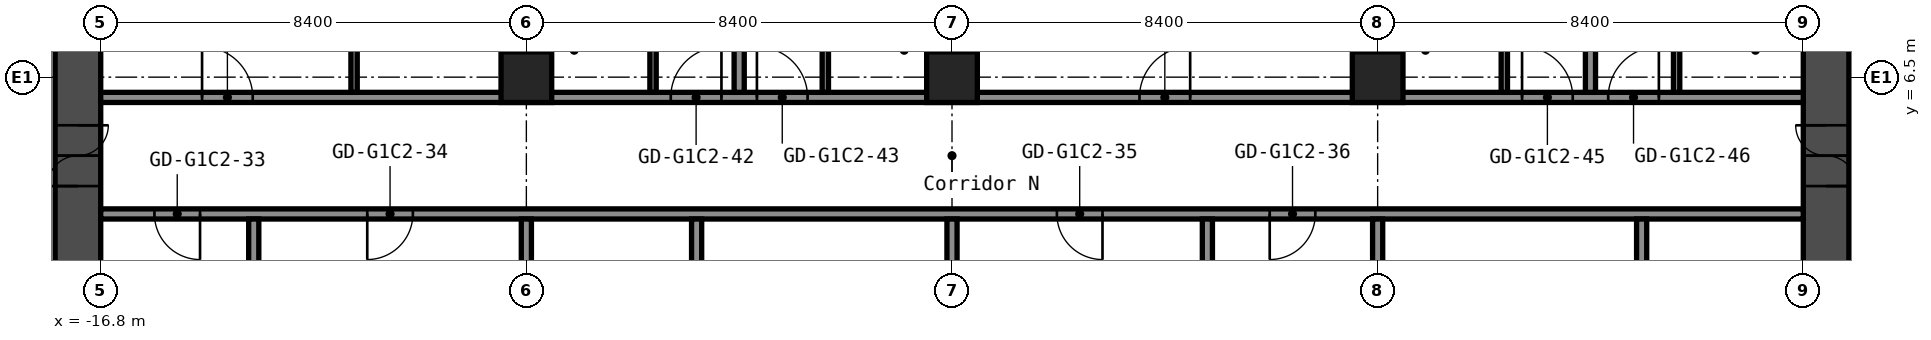
"""IFC4 building model, lengths in metres.
Left out: names, types, materials, properties, quantities, classifications, styles, units other than length and angle.
Written with IfcOpenShell. Run it as: python <this file> out.ifc"""

import sys

from ifc_helpers import new_model, si_unit, direction, frame, frame_2d, origin, origin_2d, place, context, subcontext, project, spatial, rectangle, hollow_rectangle, extrude, element, fill, save


model = new_model("IFC4")
c1 = context("Model", 3, precision=1e-05, world=origin(), true_north=direction((0.0, 1.0)))
c2 = subcontext(c1, "Body", "Model", "MODEL_VIEW")
j1 = project(units=[si_unit("LENGTHUNIT", "METRE"), si_unit("PLANEANGLEUNIT", "RADIAN")], contexts=[c1])
p1 = place(None, origin())
s1 = spatial("IfcSite", under=j1, at=p1, CompositionType="ELEMENT")
p2 = place(p1, origin())
s2 = spatial("IfcBuilding", under=s1, at=p2, CompositionType="ELEMENT")
p3 = place(p2, frame((0.0, 0.0, 58.2)))
s3 = spatial("IfcBuildingStorey", under=s2, at=p3, CompositionType="ELEMENT", Elevation=58.2)
for number, where, z_axis, x_axis in (
    (1, (-8.4, 6.5, 0.0), (0.0, 0.0, 1.0), (1.0, 0.0, 0.0)),
    (2, (0.0, 6.5, 0.0), (0.0, 0.0, 1.0), (1.0, 0.0, 0.0)),
    (3, (8.4, 6.5, 0.0), (0.0, 0.0, 1.0), (1.0, 0.0, 0.0)),
):
    element("IfcColumn", number, at=place(p3, frame(where, z_axis=z_axis, x_axis=x_axis)), inside=s3, PredefinedType="COLUMN", context=c2, shape_type="SweptSolid", body=[
        extrude(hollow_rectangle(XDim=1.0, YDim=1.0, WallThickness=0.04, at=origin_2d()), origin(), (0.0, 0.0, 1.0), 2.8),
    ])
p4 = place(p3, frame((-17.25, -8.4, 0.0), z_axis=(0.0, 0.0, 1.0), x_axis=(0.0, 1.0, 0.0)))
e4 = element("IfcWall", 4, at=p4, inside=s3, PredefinedType="SHEAR", context=c2, shape_type="SweptSolid", body=[
    extrude(rectangle(XDim=16.8, YDim=0.9, at=frame_2d((8.4, 0.0))), origin(), (0.0, 0.0, 1.0), 2.8),
])
p5 = place(p4, frame((12.75, 0.0, 0.0)))
e5 = element("IfcOpeningElement", 5, at=p5, cuts=e4, PredefinedType="OPENING", context=c2, shape_type="SweptSolid", body=[
    extrude(rectangle(XDim=1.2, YDim=2.1, at=frame_2d((0.6, 1.05))), frame((0.0, 0.46, 0.0), z_axis=(0.0, -1.0, 0.0), x_axis=(1.0, 0.0, 0.0)), (0.0, 0.0, 1.0), 0.92),
])
p6 = place(p4, frame((2.85, 0.0, 0.0)))
e6 = element("IfcOpeningElement", 6, at=p6, cuts=e4, PredefinedType="OPENING", context=c2, shape_type="SweptSolid", body=[
    extrude(rectangle(XDim=1.2, YDim=2.1, at=frame_2d((0.6, 1.05))), frame((0.0, 0.46, 0.0), z_axis=(0.0, -1.0, 0.0), x_axis=(1.0, 0.0, 0.0)), (0.0, 0.0, 1.0), 0.92),
])
p7 = place(p3, frame((17.25, -8.4, 0.0), z_axis=(0.0, 0.0, 1.0), x_axis=(0.0, 1.0, 0.0)))
e7 = element("IfcWall", 7, at=p7, inside=s3, PredefinedType="SHEAR", context=c2, shape_type="SweptSolid", body=[
    extrude(rectangle(XDim=16.8, YDim=0.9, at=frame_2d((8.4, 0.0))), origin(), (0.0, 0.0, 1.0), 2.8),
])
p8 = place(p7, frame((12.75, 0.0, 0.0)))
e8 = element("IfcOpeningElement", 8, at=p8, cuts=e7, PredefinedType="OPENING", context=c2, shape_type="SweptSolid", body=[
    extrude(rectangle(XDim=1.2, YDim=2.1, at=frame_2d((0.6, 1.05))), frame((0.0, 0.46, 0.0), z_axis=(0.0, -1.0, 0.0), x_axis=(1.0, 0.0, 0.0)), (0.0, 0.0, 1.0), 0.92),
])
p9 = place(p7, frame((2.85, 0.0, 0.0)))
e9 = element("IfcOpeningElement", 9, at=p9, cuts=e7, PredefinedType="OPENING", context=c2, shape_type="SweptSolid", body=[
    extrude(rectangle(XDim=1.2, YDim=2.1, at=frame_2d((0.6, 1.05))), frame((0.0, 0.46, 0.0), z_axis=(0.0, -1.0, 0.0), x_axis=(1.0, 0.0, 0.0)), (0.0, 0.0, 1.0), 0.92),
])
p10 = place(p3, frame((-16.8, 3.8, 0.0), z_axis=(0.0, 0.0, 1.0), x_axis=(1.0, 0.0, 0.0)))
e10 = element("IfcWall", 10, at=p10, inside=s3, PredefinedType="PARTITIONING", context=c2, shape_type="SweptSolid", body=[
    extrude(rectangle(XDim=33.6, YDim=0.2, at=frame_2d((16.8, 0.0))), origin(), (0.0, 0.0, 1.0), 2.8),
])
p11 = place(p10, frame((1.06, 0.0, 0.0)))
e11 = element("IfcOpeningElement", 11, at=p11, cuts=e10, PredefinedType="OPENING", context=c2, shape_type="SweptSolid", body=[
    extrude(rectangle(XDim=0.9, YDim=2.1, at=frame_2d((0.45, 1.05))), frame((0.0, 0.11, 0.0), z_axis=(0.0, -1.0, 0.0), x_axis=(1.0, 0.0, 0.0)), (0.0, 0.0, 1.0), 0.22),
])
p12 = place(p10, frame((5.26, 0.0, 0.0)))
e12 = element("IfcOpeningElement", 12, at=p12, cuts=e10, PredefinedType="OPENING", context=c2, shape_type="SweptSolid", body=[
    extrude(rectangle(XDim=0.9, YDim=2.1, at=frame_2d((0.45, 1.05))), frame((0.0, 0.11, 0.0), z_axis=(0.0, -1.0, 0.0), x_axis=(1.0, 0.0, 0.0)), (0.0, 0.0, 1.0), 0.22),
])
p13 = place(p10, frame((18.87, 0.0, 0.0)))
e13 = element("IfcOpeningElement", 13, at=p13, cuts=e10, PredefinedType="OPENING", context=c2, shape_type="SweptSolid", body=[
    extrude(rectangle(XDim=0.9, YDim=2.1, at=frame_2d((0.45, 1.05))), frame((0.0, 0.11, 0.0), z_axis=(0.0, -1.0, 0.0), x_axis=(1.0, 0.0, 0.0)), (0.0, 0.0, 1.0), 0.22),
])
p14 = place(p10, frame((23.07, 0.0, 0.0)))
e14 = element("IfcOpeningElement", 14, at=p14, cuts=e10, PredefinedType="OPENING", context=c2, shape_type="SweptSolid", body=[
    extrude(rectangle(XDim=0.9, YDim=2.1, at=frame_2d((0.45, 1.05))), frame((0.0, 0.11, 0.0), z_axis=(0.0, -1.0, 0.0), x_axis=(1.0, 0.0, 0.0)), (0.0, 0.0, 1.0), 0.22),
])
p15 = place(p3, frame((-16.8, 6.1, 0.0), z_axis=(0.0, 0.0, 1.0), x_axis=(1.0, 0.0, 0.0)))
e15 = element("IfcWall", 15, at=p15, inside=s3, PredefinedType="PARTITIONING", context=c2, shape_type="SweptSolid", body=[
    extrude(rectangle(XDim=33.6, YDim=0.2, at=frame_2d((16.8, 0.0))), origin(), (0.0, 0.0, 1.0), 2.8),
])
p16 = place(p15, frame((2.0, 0.0, 0.0)))
e16 = element("IfcOpeningElement", 16, at=p16, cuts=e15, PredefinedType="OPENING", context=c2, shape_type="SweptSolid", body=[
    extrude(rectangle(XDim=1.0, YDim=2.1, at=frame_2d((0.5, 1.05))), frame((0.0, 0.11, 0.0), z_axis=(0.0, -1.0, 0.0), x_axis=(1.0, 0.0, 0.0)), (0.0, 0.0, 1.0), 0.22),
])
p17 = place(p15, frame((11.25, 0.0, 0.0)))
e17 = element("IfcOpeningElement", 17, at=p17, cuts=e15, PredefinedType="OPENING", context=c2, shape_type="SweptSolid", body=[
    extrude(rectangle(XDim=1.0, YDim=2.1, at=frame_2d((0.5, 1.05))), frame((0.0, 0.11, 0.0), z_axis=(0.0, -1.0, 0.0), x_axis=(1.0, 0.0, 0.0)), (0.0, 0.0, 1.0), 0.22),
])
p18 = place(p15, frame((12.95, 0.0, 0.0)))
e18 = element("IfcOpeningElement", 18, at=p18, cuts=e15, PredefinedType="OPENING", context=c2, shape_type="SweptSolid", body=[
    extrude(rectangle(XDim=1.0, YDim=2.1, at=frame_2d((0.5, 1.05))), frame((0.0, 0.11, 0.0), z_axis=(0.0, -1.0, 0.0), x_axis=(1.0, 0.0, 0.0)), (0.0, 0.0, 1.0), 0.22),
])
p19 = place(p15, frame((20.5, 0.0, 0.0)))
e19 = element("IfcOpeningElement", 19, at=p19, cuts=e15, PredefinedType="OPENING", context=c2, shape_type="SweptSolid", body=[
    extrude(rectangle(XDim=1.0, YDim=2.1, at=frame_2d((0.5, 1.05))), frame((0.0, 0.11, 0.0), z_axis=(0.0, -1.0, 0.0), x_axis=(1.0, 0.0, 0.0)), (0.0, 0.0, 1.0), 0.22),
])
p20 = place(p15, frame((28.05, 0.0, 0.0)))
e20 = element("IfcOpeningElement", 20, at=p20, cuts=e15, PredefinedType="OPENING", context=c2, shape_type="SweptSolid", body=[
    extrude(rectangle(XDim=1.0, YDim=2.1, at=frame_2d((0.5, 1.05))), frame((0.0, 0.11, 0.0), z_axis=(0.0, -1.0, 0.0), x_axis=(1.0, 0.0, 0.0)), (0.0, 0.0, 1.0), 0.22),
])
p21 = place(p15, frame((29.75, 0.0, 0.0)))
e21 = element("IfcOpeningElement", 21, at=p21, cuts=e15, PredefinedType="OPENING", context=c2, shape_type="SweptSolid", body=[
    extrude(rectangle(XDim=1.0, YDim=2.1, at=frame_2d((0.5, 1.05))), frame((0.0, 0.11, 0.0), z_axis=(0.0, -1.0, 0.0), x_axis=(1.0, 0.0, 0.0)), (0.0, 0.0, 1.0), 0.22),
])
p22 = place(p3, frame((-13.78, -3.7, 0.0), z_axis=(0.0, 0.0, 1.0), x_axis=(0.0, 1.0, 0.0)))
e22 = element("IfcWall", 22, at=p22, inside=s3, PredefinedType="PARTITIONING", context=c2, shape_type="SweptSolid", body=[
    extrude(rectangle(XDim=7.4, YDim=0.2, at=frame_2d((3.7, 0.0))), origin(), (0.0, 0.0, 1.0), 2.8),
])
p23 = place(p3, frame((-11.8, 6.2, 0.0), z_axis=(0.0, 0.0, 1.0), x_axis=(0.0, 1.0, 0.0)))
e23 = element("IfcWall", 23, at=p23, inside=s3, PredefinedType="PARTITIONING", context=c2, shape_type="SweptSolid", body=[
    extrude(rectangle(XDim=3.3, YDim=0.125, at=frame_2d((1.65, 0.0))), origin(), (0.0, 0.0, 1.0), 2.8),
])
p24 = place(p3, frame((-8.4, -3.7, 0.0), z_axis=(0.0, 0.0, 1.0), x_axis=(0.0, 1.0, 0.0)))
e24 = element("IfcWall", 24, at=p24, inside=s3, PredefinedType="PARTITIONING", context=c2, shape_type="SweptSolid", body=[
    extrude(rectangle(XDim=7.4, YDim=0.2, at=frame_2d((3.7, 0.0))), origin(), (0.0, 0.0, 1.0), 2.8),
])
p25 = place(p3, frame((-8.4, 6.99, 0.0), z_axis=(0.0, 0.0, 1.0), x_axis=(0.0, 1.0, 0.0)))
e25 = element("IfcWall", 25, at=p25, inside=s3, PredefinedType="PARTITIONING", context=c2, shape_type="SweptSolid", body=[
    extrude(rectangle(XDim=13.31, YDim=0.2, at=frame_2d((6.655, 0.0))), origin(), (0.0, 0.0, 1.0), 2.8),
])
p26 = place(p3, frame((-5.9, 6.2, 0.0), z_axis=(0.0, 0.0, 1.0), x_axis=(0.0, 1.0, 0.0)))
e26 = element("IfcWall", 26, at=p26, inside=s3, PredefinedType="PARTITIONING", context=c2, shape_type="SweptSolid", body=[
    extrude(rectangle(XDim=2.9, YDim=0.125, at=frame_2d((1.45, 0.0))), origin(), (0.0, 0.0, 1.0), 2.8),
])
p27 = place(p26, frame((1.5, 0.0, 0.0)))
e27 = element("IfcOpeningElement", 27, at=p27, cuts=e26, PredefinedType="OPENING", context=c2, shape_type="SweptSolid", body=[
    extrude(rectangle(XDim=0.8, YDim=2.1, at=frame_2d((0.4, 1.05))), frame((0.0, 0.073, 0.0), z_axis=(0.0, -1.0, 0.0), x_axis=(1.0, 0.0, 0.0)), (0.0, 0.0, 1.0), 0.145),
])
p28 = place(p3, frame((-5.04, -3.7, 0.0), z_axis=(0.0, 0.0, 1.0), x_axis=(0.0, 1.0, 0.0)))
e28 = element("IfcWall", 28, at=p28, inside=s3, PredefinedType="PARTITIONING", context=c2, shape_type="SweptSolid", body=[
    extrude(rectangle(XDim=7.4, YDim=0.2, at=frame_2d((3.7, 0.0))), origin(), (0.0, 0.0, 1.0), 2.8),
])
p29 = place(p3, frame((-4.2, 6.2, 0.0), z_axis=(0.0, 0.0, 1.0), x_axis=(0.0, 1.0, 0.0)))
e29 = element("IfcWall", 29, at=p29, inside=s3, PredefinedType="PARTITIONING", context=c2, shape_type="SweptSolid", body=[
    extrude(rectangle(XDim=14.1, YDim=0.2, at=frame_2d((7.05, 0.0))), origin(), (0.0, 0.0, 1.0), 2.8),
])
p30 = place(p3, frame((-2.5, 6.2, 0.0), z_axis=(0.0, 0.0, 1.0), x_axis=(0.0, 1.0, 0.0)))
e30 = element("IfcWall", 30, at=p30, inside=s3, PredefinedType="PARTITIONING", context=c2, shape_type="SweptSolid", body=[
    extrude(rectangle(XDim=2.9, YDim=0.125, at=frame_2d((1.45, 0.0))), origin(), (0.0, 0.0, 1.0), 2.8),
])
p31 = place(p30, frame((1.5, 0.0, 0.0)))
e31 = element("IfcOpeningElement", 31, at=p31, cuts=e30, PredefinedType="OPENING", context=c2, shape_type="SweptSolid", body=[
    extrude(rectangle(XDim=0.8, YDim=2.1, at=frame_2d((0.4, 1.05))), frame((0.0, 0.073, 0.0), z_axis=(0.0, -1.0, 0.0), x_axis=(1.0, 0.0, 0.0)), (0.0, 0.0, 1.0), 0.145),
])
p32 = place(p3, frame((0.0, -3.7, 0.0), z_axis=(0.0, 0.0, 1.0), x_axis=(0.0, 1.0, 0.0)))
e32 = element("IfcWall", 32, at=p32, inside=s3, PredefinedType="PARTITIONING", context=c2, shape_type="SweptSolid", body=[
    extrude(rectangle(XDim=7.4, YDim=0.2, at=frame_2d((3.7, 0.0))), origin(), (0.0, 0.0, 1.0), 2.8),
])
p33 = place(p3, frame((0.0, 6.99, 0.0), z_axis=(0.0, 0.0, 1.0), x_axis=(0.0, 1.0, 0.0)))
e33 = element("IfcWall", 33, at=p33, inside=s3, PredefinedType="PARTITIONING", context=c2, shape_type="SweptSolid", body=[
    extrude(rectangle(XDim=13.31, YDim=0.2, at=frame_2d((6.655, 0.0))), origin(), (0.0, 0.0, 1.0), 2.8),
])
for number, where, z_axis, x_axis in (
    (34, (5.04, -3.7, 0.0), (0.0, 0.0, 1.0), (0.0, 1.0, 0.0)),
    (35, (8.4, -3.7, 0.0), (0.0, 0.0, 1.0), (0.0, 1.0, 0.0)),
):
    element("IfcWall", number, at=place(p3, frame(where, z_axis=z_axis, x_axis=x_axis)), inside=s3, PredefinedType="PARTITIONING", context=c2, shape_type="SweptSolid", body=[
        extrude(rectangle(XDim=7.4, YDim=0.2, at=frame_2d((3.7, 0.0))), origin(), (0.0, 0.0, 1.0), 2.8),
    ])
p34 = place(p3, frame((8.4, 6.99, 0.0), z_axis=(0.0, 0.0, 1.0), x_axis=(0.0, 1.0, 0.0)))
e36 = element("IfcWall", 36, at=p34, inside=s3, PredefinedType="PARTITIONING", context=c2, shape_type="SweptSolid", body=[
    extrude(rectangle(XDim=13.31, YDim=0.2, at=frame_2d((6.655, 0.0))), origin(), (0.0, 0.0, 1.0), 2.8),
])
p35 = place(p3, frame((10.9, 6.2, 0.0), z_axis=(0.0, 0.0, 1.0), x_axis=(0.0, 1.0, 0.0)))
e37 = element("IfcWall", 37, at=p35, inside=s3, PredefinedType="PARTITIONING", context=c2, shape_type="SweptSolid", body=[
    extrude(rectangle(XDim=2.9, YDim=0.125, at=frame_2d((1.45, 0.0))), origin(), (0.0, 0.0, 1.0), 2.8),
])
p36 = place(p35, frame((1.5, 0.0, 0.0)))
e38 = element("IfcOpeningElement", 38, at=p36, cuts=e37, PredefinedType="OPENING", context=c2, shape_type="SweptSolid", body=[
    extrude(rectangle(XDim=0.8, YDim=2.1, at=frame_2d((0.4, 1.05))), frame((0.0, 0.073, 0.0), z_axis=(0.0, -1.0, 0.0), x_axis=(1.0, 0.0, 0.0)), (0.0, 0.0, 1.0), 0.145),
])
p37 = place(p3, frame((12.6, 6.2, 0.0), z_axis=(0.0, 0.0, 1.0), x_axis=(0.0, 1.0, 0.0)))
e39 = element("IfcWall", 39, at=p37, inside=s3, PredefinedType="PARTITIONING", context=c2, shape_type="SweptSolid", body=[
    extrude(rectangle(XDim=14.1, YDim=0.2, at=frame_2d((7.05, 0.0))), origin(), (0.0, 0.0, 1.0), 2.8),
])
p38 = place(p3, frame((13.61, -3.7, 0.0), z_axis=(0.0, 0.0, 1.0), x_axis=(0.0, 1.0, 0.0)))
e40 = element("IfcWall", 40, at=p38, inside=s3, PredefinedType="PARTITIONING", context=c2, shape_type="SweptSolid", body=[
    extrude(rectangle(XDim=7.4, YDim=0.2, at=frame_2d((3.7, 0.0))), origin(), (0.0, 0.0, 1.0), 2.8),
])
p39 = place(p3, frame((14.3, 6.2, 0.0), z_axis=(0.0, 0.0, 1.0), x_axis=(0.0, 1.0, 0.0)))
e41 = element("IfcWall", 41, at=p39, inside=s3, PredefinedType="PARTITIONING", context=c2, shape_type="SweptSolid", body=[
    extrude(rectangle(XDim=2.9, YDim=0.125, at=frame_2d((1.45, 0.0))), origin(), (0.0, 0.0, 1.0), 2.8),
])
p40 = place(p39, frame((1.5, 0.0, 0.0)))
e42 = element("IfcOpeningElement", 42, at=p40, cuts=e41, PredefinedType="OPENING", context=c2, shape_type="SweptSolid", body=[
    extrude(rectangle(XDim=0.8, YDim=2.1, at=frame_2d((0.4, 1.05))), frame((0.0, 0.073, 0.0), z_axis=(0.0, -1.0, 0.0), x_axis=(1.0, 0.0, 0.0)), (0.0, 0.0, 1.0), 0.145),
])
p41 = place(p5, origin())
e43 = element("IfcDoor", 43, at=p41, inside=s3, OperationType="DOUBLE_DOOR_SINGLE_SWING", PredefinedType="DOOR", context=c2, shape_type="SweptSolid", body=[
    extrude(rectangle(XDim=1.2, YDim=2.1, at=frame_2d((0.6, 1.05))), frame((0.0, 0.025, 0.0), z_axis=(0.0, -1.0, 0.0), x_axis=(1.0, 0.0, 0.0)), (0.0, 0.0, 1.0), 0.05),
])
fill(e5, e43)
p42 = place(p8, origin())
e44 = element("IfcDoor", 44, at=p42, inside=s3, OperationType="DOUBLE_DOOR_SINGLE_SWING", PredefinedType="DOOR", context=c2, shape_type="SweptSolid", body=[
    extrude(rectangle(XDim=1.2, YDim=2.1, at=frame_2d((0.6, 1.05))), frame((0.0, 0.025, 0.0), z_axis=(0.0, -1.0, 0.0), x_axis=(1.0, 0.0, 0.0)), (0.0, 0.0, 1.0), 0.05),
])
fill(e8, e44)
p43 = place(p11, origin())
e45 = element("IfcDoor", 45, at=p43, inside=s3, OperationType="SINGLE_SWING_RIGHT", PredefinedType="DOOR", context=c2, shape_type="SweptSolid", body=[
    extrude(rectangle(XDim=0.9, YDim=2.1, at=frame_2d((0.45, 1.05))), frame((0.0, 0.025, 0.0), z_axis=(0.0, -1.0, 0.0), x_axis=(1.0, 0.0, 0.0)), (0.0, 0.0, 1.0), 0.05),
])
fill(e11, e45)
p44 = place(p12, origin())
e46 = element("IfcDoor", 46, at=p44, inside=s3, OperationType="SINGLE_SWING_LEFT", PredefinedType="DOOR", context=c2, shape_type="SweptSolid", body=[
    extrude(rectangle(XDim=0.9, YDim=2.1, at=frame_2d((0.45, 1.05))), frame((0.0, 0.025, 0.0), z_axis=(0.0, -1.0, 0.0), x_axis=(1.0, 0.0, 0.0)), (0.0, 0.0, 1.0), 0.05),
])
fill(e12, e46)
p45 = place(p13, origin())
e47 = element("IfcDoor", 47, at=p45, inside=s3, OperationType="SINGLE_SWING_RIGHT", PredefinedType="DOOR", context=c2, shape_type="SweptSolid", body=[
    extrude(rectangle(XDim=0.9, YDim=2.1, at=frame_2d((0.45, 1.05))), frame((0.0, 0.025, 0.0), z_axis=(0.0, -1.0, 0.0), x_axis=(1.0, 0.0, 0.0)), (0.0, 0.0, 1.0), 0.05),
])
fill(e13, e47)
p46 = place(p14, origin())
e48 = element("IfcDoor", 48, at=p46, inside=s3, OperationType="SINGLE_SWING_LEFT", PredefinedType="DOOR", context=c2, shape_type="SweptSolid", body=[
    extrude(rectangle(XDim=0.9, YDim=2.1, at=frame_2d((0.45, 1.05))), frame((0.0, 0.025, 0.0), z_axis=(0.0, -1.0, 0.0), x_axis=(1.0, 0.0, 0.0)), (0.0, 0.0, 1.0), 0.05),
])
fill(e14, e48)
p47 = place(p16, origin())
e49 = element("IfcDoor", 49, at=p47, inside=s3, OperationType="SINGLE_SWING_RIGHT", PredefinedType="DOOR", context=c2, shape_type="SweptSolid", body=[
    extrude(rectangle(XDim=1.0, YDim=2.1, at=frame_2d((0.5, 1.05))), frame((0.0, 0.025, 0.0), z_axis=(0.0, -1.0, 0.0), x_axis=(1.0, 0.0, 0.0)), (0.0, 0.0, 1.0), 0.05),
])
fill(e16, e49)
p48 = place(p17, origin())
e50 = element("IfcDoor", 50, at=p48, inside=s3, OperationType="SINGLE_SWING_LEFT", PredefinedType="DOOR", context=c2, shape_type="SweptSolid", body=[
    extrude(rectangle(XDim=1.0, YDim=2.1, at=frame_2d((0.5, 1.05))), frame((0.0, 0.025, 0.0), z_axis=(0.0, -1.0, 0.0), x_axis=(1.0, 0.0, 0.0)), (0.0, 0.0, 1.0), 0.05),
])
fill(e17, e50)
p49 = place(p18, origin())
e51 = element("IfcDoor", 51, at=p49, inside=s3, OperationType="SINGLE_SWING_RIGHT", PredefinedType="DOOR", context=c2, shape_type="SweptSolid", body=[
    extrude(rectangle(XDim=1.0, YDim=2.1, at=frame_2d((0.5, 1.05))), frame((0.0, 0.025, 0.0), z_axis=(0.0, -1.0, 0.0), x_axis=(1.0, 0.0, 0.0)), (0.0, 0.0, 1.0), 0.05),
])
fill(e18, e51)
p50 = place(p19, origin())
e52 = element("IfcDoor", 52, at=p50, inside=s3, OperationType="SINGLE_SWING_LEFT", PredefinedType="DOOR", context=c2, shape_type="SweptSolid", body=[
    extrude(rectangle(XDim=1.0, YDim=2.1, at=frame_2d((0.5, 1.05))), frame((0.0, 0.025, 0.0), z_axis=(0.0, -1.0, 0.0), x_axis=(1.0, 0.0, 0.0)), (0.0, 0.0, 1.0), 0.05),
])
fill(e19, e52)
p51 = place(p20, origin())
e53 = element("IfcDoor", 53, at=p51, inside=s3, OperationType="SINGLE_SWING_RIGHT", PredefinedType="DOOR", context=c2, shape_type="SweptSolid", body=[
    extrude(rectangle(XDim=1.0, YDim=2.1, at=frame_2d((0.5, 1.05))), frame((0.0, 0.025, 0.0), z_axis=(0.0, -1.0, 0.0), x_axis=(1.0, 0.0, 0.0)), (0.0, 0.0, 1.0), 0.05),
])
fill(e20, e53)
p52 = place(p21, origin())
e54 = element("IfcDoor", 54, at=p52, inside=s3, OperationType="SINGLE_SWING_LEFT", PredefinedType="DOOR", context=c2, shape_type="SweptSolid", body=[
    extrude(rectangle(XDim=1.0, YDim=2.1, at=frame_2d((0.5, 1.05))), frame((0.0, 0.025, 0.0), z_axis=(0.0, -1.0, 0.0), x_axis=(1.0, 0.0, 0.0)), (0.0, 0.0, 1.0), 0.05),
])
fill(e21, e54)
save(model, sys.argv[1])
